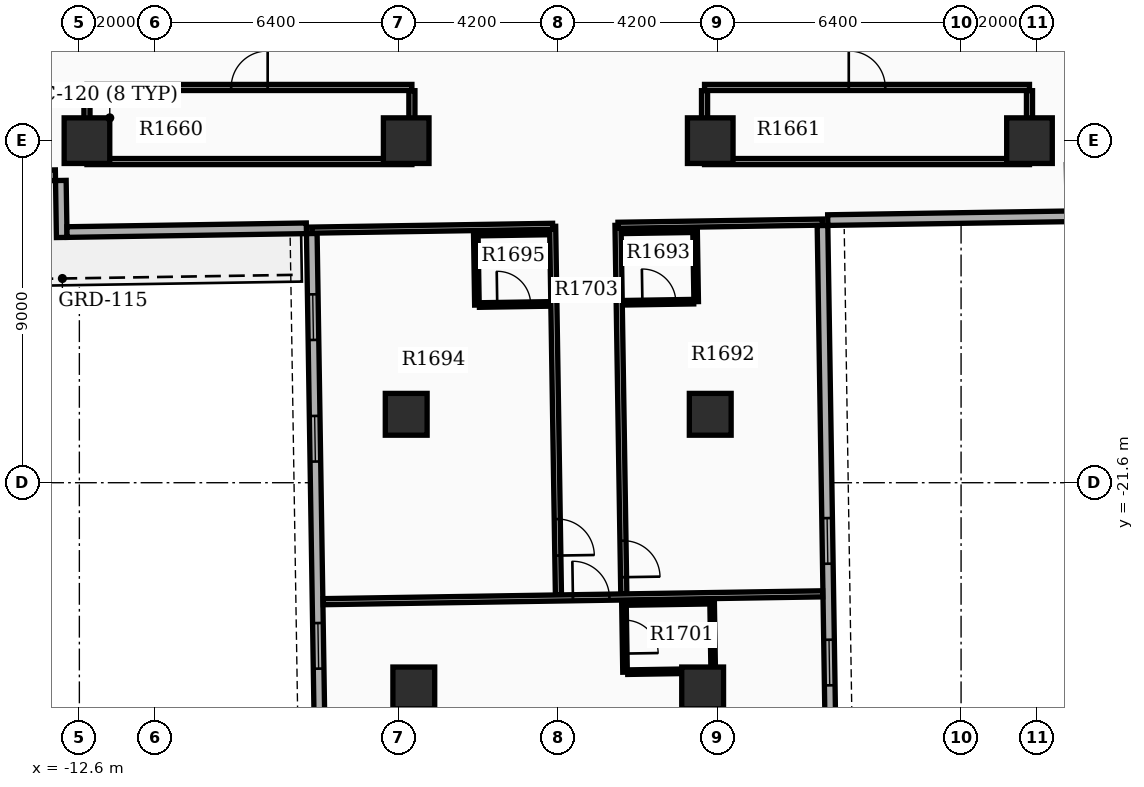
"""IFC4 building model, lengths in metres.
Left out: names, types, materials, properties, quantities, classifications, styles, units other than length and angle.
Written with IfcOpenShell. Run it as: python <this file> out.ifc"""

import sys

from ifc_helpers import new_model, si_unit, direction, frame, frame_2d, origin, origin_2d, place, context, subcontext, project, spatial, rectangle, extrude, element, fill, save


model = new_model("IFC4")
c1 = context("Model", 3, precision=1e-05, world=origin(), true_north=direction((0.0, 1.0)))
c2 = subcontext(c1, "Body", "Model", "MODEL_VIEW")
j1 = project(units=[si_unit("LENGTHUNIT", "METRE"), si_unit("PLANEANGLEUNIT", "RADIAN")], contexts=[c1])
p1 = place(None, origin())
s1 = spatial("IfcSite", under=j1, at=p1, CompositionType="ELEMENT")
p2 = place(p1, origin())
s2 = spatial("IfcBuilding", under=s1, at=p2, CompositionType="ELEMENT")
p3 = place(p2, frame((0.0, 0.0, 108.6)))
s3 = spatial("IfcBuildingStorey", under=s2, at=p3, CompositionType="ELEMENT", Elevation=108.6)
for number, where, z_axis, x_axis in (
    (1, (-12.4, -12.6, 0.0), (0.0, 0.0, 1.0), (1.0, 0.0, 0.0)),
    (2, (12.4, -12.6, 0.0), (0.0, 0.0, 1.0), (1.0, 0.0, 0.0)),
    (3, (-4.0, -12.6, 0.0), (0.0, 0.0, 1.0), (1.0, 0.0, 0.0)),
    (4, (4.0, -12.6, 0.0), (0.0, 0.0, 1.0), (1.0, 0.0, 0.0)),
):
    element("IfcColumn", number, at=place(p3, frame(where, z_axis=z_axis, x_axis=x_axis)), inside=s3, PredefinedType="COLUMN", context=c2, shape_type="SweptSolid", body=[
        extrude(rectangle(XDim=1.2, YDim=1.2, at=origin_2d()), origin(), (0.0, 0.0, 1.0), 3.9),
    ])
for number, where, z_axis, x_axis in (
    (5, (-4.0, -19.8, 0.0), (0.0, 0.0, 1.0), (1.0, 0.0, 0.0)),
    (6, (4.0, -19.8, 0.0), (0.0, 0.0, 1.0), (1.0, 0.0, 0.0)),
    (7, (-3.8, -27.0, 0.0), (0.0, 0.0, 1.0), (1.0, 0.0, 0.0)),
    (8, (3.8, -27.0, 0.0), (0.0, 0.0, 1.0), (1.0, 0.0, 0.0)),
):
    element("IfcColumn", number, at=place(p3, frame(where, z_axis=z_axis, x_axis=x_axis)), inside=s3, PredefinedType="COLUMN", context=c2, shape_type="SweptSolid", body=[
        extrude(rectangle(XDim=1.1, YDim=1.1, at=origin_2d()), origin(), (0.0, 0.0, 1.0), 3.9),
    ])
p4 = place(p3, frame((-6.485, -15.044, 0.0), z_axis=(0.0, 0.0, 1.0), x_axis=(0.01571739401, -0.999876474133, 0.0)))
e9 = element("IfcWall", 9, at=p4, inside=s3, PredefinedType="STANDARD", context=c2, shape_type="SweptSolid", body=[
    extrude(rectangle(XDim=20.1, YDim=0.28, at=frame_2d((10.05, 0.0))), origin(), (0.0, 0.0, 1.0), 2.97),
])
p5 = place(p4, frame((1.6, 0.0, 0.8)))
e10 = element("IfcOpeningElement", 10, at=p5, cuts=e9, PredefinedType="OPENING", context=c2, shape_type="SweptSolid", body=[
    extrude(rectangle(XDim=1.2, YDim=1.6, at=frame_2d((0.6, 0.8))), frame((0.0, 0.15, 0.0), z_axis=(0.0, -1.0, 0.0), x_axis=(1.0, 0.0, 0.0)), (0.0, 0.0, 1.0), 0.3),
])
p6 = place(p4, frame((4.8, 0.0, 0.8)))
e11 = element("IfcOpeningElement", 11, at=p6, cuts=e9, PredefinedType="OPENING", context=c2, shape_type="SweptSolid", body=[
    extrude(rectangle(XDim=1.2, YDim=1.6, at=frame_2d((0.6, 0.8))), frame((0.0, 0.15, 0.0), z_axis=(0.0, -1.0, 0.0), x_axis=(1.0, 0.0, 0.0)), (0.0, 0.0, 1.0), 0.3),
])
p7 = place(p4, frame((10.25, 0.0, 0.8)))
e12 = element("IfcOpeningElement", 12, at=p7, cuts=e9, PredefinedType="OPENING", context=c2, shape_type="SweptSolid", body=[
    extrude(rectangle(XDim=1.2, YDim=1.6, at=frame_2d((0.6, 0.8))), frame((0.0, 0.15, 0.0), z_axis=(0.0, -1.0, 0.0), x_axis=(1.0, 0.0, 0.0)), (0.0, 0.0, 1.0), 0.3),
])
p8 = place(p4, frame((13.45, 0.0, 0.8)))
e13 = element("IfcOpeningElement", 13, at=p8, cuts=e9, PredefinedType="OPENING", context=c2, shape_type="SweptSolid", body=[
    extrude(rectangle(XDim=1.2, YDim=1.6, at=frame_2d((0.6, 0.8))), frame((0.0, 0.15, 0.0), z_axis=(0.0, -1.0, 0.0), x_axis=(1.0, 0.0, 0.0)), (0.0, 0.0, 1.0), 0.3),
])
p9 = place(p3, frame((7.27, -34.93, 0.0), z_axis=(0.0, 0.0, 1.0), x_axis=(-0.015705059908, 0.999876667941, 0.0)))
e14 = element("IfcWall", 14, at=p9, inside=s3, PredefinedType="STANDARD", context=c2, shape_type="SweptSolid", body=[
    extrude(rectangle(XDim=20.1, YDim=0.28, at=frame_2d((10.05, 0.0))), origin(), (0.0, 0.0, 1.0), 2.97),
])
p10 = place(p9, frame((1.6, 0.0, 0.8)))
e15 = element("IfcOpeningElement", 15, at=p10, cuts=e14, PredefinedType="OPENING", context=c2, shape_type="SweptSolid", body=[
    extrude(rectangle(XDim=1.2, YDim=1.6, at=frame_2d((0.6, 0.8))), frame((0.0, 0.15, 0.0), z_axis=(0.0, -1.0, 0.0), x_axis=(1.0, 0.0, 0.0)), (0.0, 0.0, 1.0), 0.3),
])
p11 = place(p9, frame((4.8, 0.0, 0.8)))
e16 = element("IfcOpeningElement", 16, at=p11, cuts=e14, PredefinedType="OPENING", context=c2, shape_type="SweptSolid", body=[
    extrude(rectangle(XDim=1.2, YDim=1.6, at=frame_2d((0.6, 0.8))), frame((0.0, 0.15, 0.0), z_axis=(0.0, -1.0, 0.0), x_axis=(1.0, 0.0, 0.0)), (0.0, 0.0, 1.0), 0.3),
])
p12 = place(p9, frame((8.0, 0.0, 0.8)))
e17 = element("IfcOpeningElement", 17, at=p12, cuts=e14, PredefinedType="OPENING", context=c2, shape_type="SweptSolid", body=[
    extrude(rectangle(XDim=1.2, YDim=1.6, at=frame_2d((0.6, 0.8))), frame((0.0, 0.15, 0.0), z_axis=(0.0, -1.0, 0.0), x_axis=(1.0, 0.0, 0.0)), (0.0, 0.0, 1.0), 0.3),
])
p13 = place(p9, frame((11.2, 0.0, 0.8)))
e18 = element("IfcOpeningElement", 18, at=p13, cuts=e14, PredefinedType="OPENING", context=c2, shape_type="SweptSolid", body=[
    extrude(rectangle(XDim=1.2, YDim=1.6, at=frame_2d((0.6, 0.8))), frame((0.0, 0.15, 0.0), z_axis=(0.0, -1.0, 0.0), x_axis=(1.0, 0.0, 0.0)), (0.0, 0.0, 1.0), 0.3),
])
p14 = place(p3, frame((-14.449, -13.529, 0.0), z_axis=(0.0, 0.0, 1.0), x_axis=(0.999878147354, 0.015610587569, 0.0)))
e19 = element("IfcWall", 19, at=p14, inside=s3, PredefinedType="STANDARD", context=c2, shape_type="SweptSolid", body=[
    extrude(rectangle(XDim=1.22, YDim=0.28, at=frame_2d((0.61, 0.0))), origin(), (0.0, 0.0, 1.0), 2.97),
])
p15 = place(p3, frame((-13.087, -13.647, 0.0), z_axis=(0.0, 0.0, 1.0), x_axis=(0.015785793208, -0.999875396603, 0.0)))
e20 = element("IfcWall", 20, at=p15, inside=s3, PredefinedType="STANDARD", context=c2, shape_type="SweptSolid", body=[
    extrude(rectangle(XDim=1.5, YDim=0.28, at=frame_2d((0.75, 0.0))), origin(), (0.0, 0.0, 1.0), 2.97),
])
p16 = place(p3, frame((-12.926, -15.005, 0.0), z_axis=(0.0, 0.0, 1.0), x_axis=(0.999876823822, 0.015695132501, 0.0)))
e21 = element("IfcWall", 21, at=p16, inside=s3, PredefinedType="STANDARD", context=c2, shape_type="SweptSolid", body=[
    extrude(rectangle(XDim=6.3, YDim=0.28, at=frame_2d((3.15, 0.0))), origin(), (0.0, 0.0, 1.0), 2.97),
])
p17 = place(p3, frame((13.391, -14.592, 0.0), z_axis=(0.0, 0.0, 1.0), x_axis=(-0.999876833368, -0.015694524359, 0.0)))
e22 = element("IfcWall", 22, at=p17, inside=s3, PredefinedType="STANDARD", context=c2, shape_type="SweptSolid", body=[
    extrude(rectangle(XDim=6.3, YDim=0.28, at=frame_2d((3.15, 0.0))), origin(), (0.0, 0.0, 1.0), 2.97),
])
p18 = place(p3, frame((-12.4, -13.15, 0.0), z_axis=(0.0, 0.0, 1.0), x_axis=(1.0, 0.0, 0.0)))
e23 = element("IfcWall", 23, at=p18, inside=s3, PredefinedType="PARTITIONING", context=c2, shape_type="SweptSolid", body=[
    extrude(rectangle(XDim=8.55, YDim=0.16, at=frame_2d((4.275, 0.0))), origin(), (0.0, 0.0, 1.0), 2.96),
])
p19 = place(p3, frame((-12.4, -11.2, 0.0), z_axis=(0.0, 0.0, 1.0), x_axis=(1.0, 0.0, 0.0)))
e24 = element("IfcWall", 24, at=p19, inside=s3, PredefinedType="PARTITIONING", context=c2, shape_type="SweptSolid", body=[
    extrude(rectangle(XDim=8.55, YDim=0.16, at=frame_2d((4.275, 0.0))), origin(), (0.0, 0.0, 1.0), 2.96),
])
p20 = place(p19, frame((3.795, 0.0, 0.0)))
e25 = element("IfcOpeningElement", 25, at=p20, cuts=e24, PredefinedType="OPENING", context=c2, shape_type="SweptSolid", body=[
    extrude(rectangle(XDim=0.96, YDim=2.15, at=frame_2d((0.48, 1.075))), frame((0.0, 0.09, 0.0), z_axis=(0.0, -1.0, 0.0), x_axis=(1.0, 0.0, 0.0)), (0.0, 0.0, 1.0), 0.18),
])
for number, where, z_axis, x_axis in (
    (26, (-12.4, -13.065, 0.0), (0.0, 0.0, 1.0), (0.0, 1.0, 0.0)),
    (27, (-3.85, -13.065, 0.0), (0.0, 0.0, 1.0), (0.0, 1.0, 0.0)),
):
    element("IfcWall", number, at=place(p3, frame(where, z_axis=z_axis, x_axis=x_axis)), inside=s3, PredefinedType="PARTITIONING", context=c2, shape_type="SweptSolid", body=[
        extrude(rectangle(XDim=1.78, YDim=0.16, at=frame_2d((0.89, 0.0))), origin(), (0.0, 0.0, 1.0), 2.96),
    ])
p21 = place(p3, frame((3.85, -13.15, 0.0), z_axis=(0.0, 0.0, 1.0), x_axis=(1.0, 0.0, 0.0)))
e28 = element("IfcWall", 28, at=p21, inside=s3, PredefinedType="PARTITIONING", context=c2, shape_type="SweptSolid", body=[
    extrude(rectangle(XDim=8.55, YDim=0.16, at=frame_2d((4.275, 0.0))), origin(), (0.0, 0.0, 1.0), 2.96),
])
p22 = place(p3, frame((3.85, -11.2, 0.0), z_axis=(0.0, 0.0, 1.0), x_axis=(1.0, 0.0, 0.0)))
e29 = element("IfcWall", 29, at=p22, inside=s3, PredefinedType="PARTITIONING", context=c2, shape_type="SweptSolid", body=[
    extrude(rectangle(XDim=8.55, YDim=0.16, at=frame_2d((4.275, 0.0))), origin(), (0.0, 0.0, 1.0), 2.96),
])
p23 = place(p22, frame((3.795, 0.0, 0.0)))
e30 = element("IfcOpeningElement", 30, at=p23, cuts=e29, PredefinedType="OPENING", context=c2, shape_type="SweptSolid", body=[
    extrude(rectangle(XDim=0.96, YDim=2.15, at=frame_2d((0.48, 1.075))), frame((0.0, 0.09, 0.0), z_axis=(0.0, -1.0, 0.0), x_axis=(1.0, 0.0, 0.0)), (0.0, 0.0, 1.0), 0.18),
])
for number, where, z_axis, x_axis in (
    (31, (3.85, -13.065, 0.0), (0.0, 0.0, 1.0), (0.0, 1.0, 0.0)),
    (32, (12.4, -13.065, 0.0), (0.0, 0.0, 1.0), (0.0, 1.0, 0.0)),
):
    element("IfcWall", number, at=place(p3, frame(where, z_axis=z_axis, x_axis=x_axis)), inside=s3, PredefinedType="PARTITIONING", context=c2, shape_type="SweptSolid", body=[
        extrude(rectangle(XDim=1.78, YDim=0.16, at=frame_2d((0.89, 0.0))), origin(), (0.0, 0.0, 1.0), 2.96),
    ])
p24 = place(p3, frame((1.573, -14.827, 0.0), z_axis=(0.0, 0.0, 1.0), x_axis=(0.015705659641, -0.999876658521, 0.0)))
e33 = element("IfcWall", 33, at=p24, inside=s3, PredefinedType="PARTITIONING", context=c2, shape_type="SweptSolid", body=[
    extrude(rectangle(XDim=9.7, YDim=0.16, at=frame_2d((4.85, 0.0))), origin(), (0.0, 0.0, 1.0), 2.96),
])
p25 = place(p24, frame((8.3, 0.0, 0.0)))
e34 = element("IfcOpeningElement", 34, at=p25, cuts=e33, PredefinedType="OPENING", context=c2, shape_type="SweptSolid", body=[
    extrude(rectangle(XDim=0.96, YDim=2.15, at=frame_2d((0.48, 1.075))), frame((0.0, 0.09, 0.0), z_axis=(0.0, -1.0, 0.0), x_axis=(1.0, 0.0, 0.0)), (0.0, 0.0, 1.0), 0.18),
])
p26 = place(p3, frame((1.573, -14.827, 0.0), z_axis=(0.0, 0.0, 1.0), x_axis=(0.999876730622, 0.015701068748, 0.0)))
e35 = element("IfcWall", 35, at=p26, inside=s3, PredefinedType="PARTITIONING", context=c2, shape_type="SweptSolid", body=[
    extrude(rectangle(XDim=5.38, YDim=0.16, at=frame_2d((2.69, 0.0))), origin(), (0.0, 0.0, 1.0), 2.96),
])
p27 = place(p3, frame((1.745, -16.865, 0.0), z_axis=(0.0, 0.0, 1.0), x_axis=(0.999876836305, 0.015694337248, 0.0)))
e36 = element("IfcWall", 36, at=p27, inside=s3, PredefinedType="PARTITIONING", context=c2, shape_type="SweptSolid", body=[
    extrude(rectangle(XDim=1.82, YDim=0.12, at=frame_2d((0.91, 0.0))), origin(), (0.0, 0.0, 1.0), 2.96),
])
p28 = place(p27, frame((0.47, 0.0, 0.0)))
e37 = element("IfcOpeningElement", 37, at=p28, cuts=e36, PredefinedType="OPENING", context=c2, shape_type="SweptSolid", body=[
    extrude(rectangle(XDim=0.88, YDim=2.1, at=frame_2d((0.44, 1.05))), frame((0.0, 0.07, 0.0), z_axis=(0.0, -1.0, 0.0), x_axis=(1.0, 0.0, 0.0)), (0.0, 0.0, 1.0), 0.14),
])
p29 = place(p3, frame((1.716, -14.985, 0.0), z_axis=(0.0, 0.0, 1.0), x_axis=(0.999876836305, 0.015694337248, 0.0)))
e38 = element("IfcWall", 38, at=p29, inside=s3, PredefinedType="PARTITIONING", context=c2, shape_type="SweptSolid", body=[
    extrude(rectangle(XDim=1.82, YDim=0.12, at=frame_2d((0.91, 0.0))), origin(), (0.0, 0.0, 1.0), 2.96),
])
p30 = place(p3, frame((3.6, -14.955, 0.0), z_axis=(0.0, 0.0, 1.0), x_axis=(0.01571234584, -0.999876553475, 0.0)))
e39 = element("IfcWall", 39, at=p30, inside=s3, PredefinedType="PARTITIONING", context=c2, shape_type="SweptSolid", body=[
    extrude(rectangle(XDim=1.88, YDim=0.12, at=frame_2d((0.94, 0.0))), origin(), (0.0, 0.0, 1.0), 2.96),
])
p31 = place(p3, frame((-0.147, -14.854, 0.0), z_axis=(0.0, 0.0, 1.0), x_axis=(0.015705264399, -0.999876664729, 0.0)))
e40 = element("IfcWall", 40, at=p31, inside=s3, PredefinedType="PARTITIONING", context=c2, shape_type="SweptSolid", body=[
    extrude(rectangle(XDim=9.7, YDim=0.16, at=frame_2d((4.85, 0.0))), origin(), (0.0, 0.0, 1.0), 2.96),
])
p32 = place(p31, frame((7.704, 0.0, 0.0)))
e41 = element("IfcOpeningElement", 41, at=p32, cuts=e40, PredefinedType="OPENING", context=c2, shape_type="SweptSolid", body=[
    extrude(rectangle(XDim=0.96, YDim=2.15, at=frame_2d((0.48, 1.075))), frame((0.0, 0.09, 0.0), z_axis=(0.0, -1.0, 0.0), x_axis=(1.0, 0.0, 0.0)), (0.0, 0.0, 1.0), 0.18),
])
p33 = place(p3, frame((-0.147, -14.854, 0.0), z_axis=(0.0, 0.0, 1.0), x_axis=(-0.999876566438, -0.015711520859, 0.0)))
e42 = element("IfcWall", 42, at=p33, inside=s3, PredefinedType="PARTITIONING", context=c2, shape_type="SweptSolid", body=[
    extrude(rectangle(XDim=6.34, YDim=0.16, at=frame_2d((3.17, 0.0))), origin(), (0.0, 0.0, 1.0), 2.96),
])
p34 = place(p3, frame((-2.074, -16.925, 0.0), z_axis=(0.0, 0.0, 1.0), x_axis=(0.999874722342, 0.015828443418, 0.0)))
e43 = element("IfcWall", 43, at=p34, inside=s3, PredefinedType="PARTITIONING", context=c2, shape_type="SweptSolid", body=[
    extrude(rectangle(XDim=1.82, YDim=0.12, at=frame_2d((0.91, 0.0))), origin(), (0.0, 0.0, 1.0), 2.96),
])
p35 = place(p34, frame((0.47, 0.0, 0.0)))
e44 = element("IfcOpeningElement", 44, at=p35, cuts=e43, PredefinedType="OPENING", context=c2, shape_type="SweptSolid", body=[
    extrude(rectangle(XDim=0.88, YDim=2.1, at=frame_2d((0.44, 1.05))), frame((0.0, 0.07, 0.0), z_axis=(0.0, -1.0, 0.0), x_axis=(1.0, 0.0, 0.0)), (0.0, 0.0, 1.0), 0.14),
])
p36 = place(p3, frame((-2.104, -15.045, 0.0), z_axis=(0.0, 0.0, 1.0), x_axis=(0.999876836305, 0.015694337248, 0.0)))
e45 = element("IfcWall", 45, at=p36, inside=s3, PredefinedType="PARTITIONING", context=c2, shape_type="SweptSolid", body=[
    extrude(rectangle(XDim=1.82, YDim=0.12, at=frame_2d((0.91, 0.0))), origin(), (0.0, 0.0, 1.0), 2.96),
])
p37 = place(p3, frame((-2.169, -15.046, 0.0), z_axis=(0.0, 0.0, 1.0), x_axis=(0.01571234584, -0.999876553475, 0.0)))
e46 = element("IfcWall", 46, at=p37, inside=s3, PredefinedType="PARTITIONING", context=c2, shape_type="SweptSolid", body=[
    extrude(rectangle(XDim=1.88, YDim=0.12, at=frame_2d((0.94, 0.0))), origin(), (0.0, 0.0, 1.0), 2.96),
])
p38 = place(p3, frame((-6.184, -24.73, 0.0), z_axis=(0.0, 0.0, 1.0), x_axis=(0.999876528878, 0.015713911007, 0.0)))
e47 = element("IfcWall", 47, at=p38, inside=s3, PredefinedType="PARTITIONING", context=c2, shape_type="SweptSolid", body=[
    extrude(rectangle(XDim=13.144, YDim=0.16, at=frame_2d((6.572, 0.0))), origin(), (0.0, 0.0, 1.0), 2.96),
])
p39 = place(p38, frame((6.572, 0.0, 0.0)))
e48 = element("IfcOpeningElement", 48, at=p39, cuts=e47, PredefinedType="OPENING", context=c2, shape_type="SweptSolid", body=[
    extrude(rectangle(XDim=0.96, YDim=2.15, at=frame_2d((0.48, 1.075))), frame((0.0, 0.09, 0.0), z_axis=(0.0, -1.0, 0.0), x_axis=(1.0, 0.0, 0.0)), (0.0, 0.0, 1.0), 0.18),
])
p40 = place(p3, frame((1.729, -24.766, 0.0), z_axis=(0.0, 0.0, 1.0), x_axis=(0.015694337248, -0.999876836305, 0.0)))
e49 = element("IfcWall", 49, at=p40, inside=s3, PredefinedType="PARTITIONING", context=c2, shape_type="SweptSolid", body=[
    extrude(rectangle(XDim=1.82, YDim=0.12, at=frame_2d((0.91, 0.0))), origin(), (0.0, 0.0, 1.0), 2.96),
])
p41 = place(p40, frame((0.45, 0.0, 0.0)))
e50 = element("IfcOpeningElement", 50, at=p41, cuts=e49, PredefinedType="OPENING", context=c2, shape_type="SweptSolid", body=[
    extrude(rectangle(XDim=0.88, YDim=2.1, at=frame_2d((0.44, 1.05))), frame((0.0, 0.07, 0.0), z_axis=(0.0, -1.0, 0.0), x_axis=(1.0, 0.0, 0.0)), (0.0, 0.0, 1.0), 0.14),
])
p42 = place(p3, frame((4.049, -24.729, 0.0), z_axis=(0.0, 0.0, 1.0), x_axis=(0.015694337248, -0.999876836305, 0.0)))
e51 = element("IfcWall", 51, at=p42, inside=s3, PredefinedType="PARTITIONING", context=c2, shape_type="SweptSolid", body=[
    extrude(rectangle(XDim=1.82, YDim=0.12, at=frame_2d((0.91, 0.0))), origin(), (0.0, 0.0, 1.0), 2.96),
])
for number, where, z_axis, x_axis in (
    (52, (1.799, -24.765, 0.0), (0.0, 0.0, 1.0), (1.0, 0.016, 0.0)),
    (53, (1.828, -26.585, 0.0), (0.0, 0.0, 1.0), (1.0, 0.016, 0.0)),
):
    element("IfcWall", number, at=place(p3, frame(where, z_axis=z_axis, x_axis=x_axis)), inside=s3, PredefinedType="PARTITIONING", context=c2, shape_type="SweptSolid", body=[
        extrude(rectangle(XDim=2.18, YDim=0.12, at=frame_2d((1.09, 0.0))), origin(), (0.0, 0.0, 1.0), 2.96),
    ])
p43 = place(p5, origin())
e54 = element("IfcWindow", 54, at=p43, inside=s3, PartitioningType="SINGLE_PANEL", PredefinedType="WINDOW", context=c2, shape_type="SweptSolid", body=[
    extrude(rectangle(XDim=1.2, YDim=1.6, at=frame_2d((0.6, 0.8))), frame((0.0, 0.03, 0.0), z_axis=(0.0, -1.0, 0.0), x_axis=(1.0, 0.0, 0.0)), (0.0, 0.0, 1.0), 0.06),
])
fill(e10, e54)
p44 = place(p6, origin())
e55 = element("IfcWindow", 55, at=p44, inside=s3, PartitioningType="SINGLE_PANEL", PredefinedType="WINDOW", context=c2, shape_type="SweptSolid", body=[
    extrude(rectangle(XDim=1.2, YDim=1.6, at=frame_2d((0.6, 0.8))), frame((0.0, 0.03, 0.0), z_axis=(0.0, -1.0, 0.0), x_axis=(1.0, 0.0, 0.0)), (0.0, 0.0, 1.0), 0.06),
])
fill(e11, e55)
p45 = place(p7, origin())
e56 = element("IfcWindow", 56, at=p45, inside=s3, PartitioningType="SINGLE_PANEL", PredefinedType="WINDOW", context=c2, shape_type="SweptSolid", body=[
    extrude(rectangle(XDim=1.2, YDim=1.6, at=frame_2d((0.6, 0.8))), frame((0.0, 0.03, 0.0), z_axis=(0.0, -1.0, 0.0), x_axis=(1.0, 0.0, 0.0)), (0.0, 0.0, 1.0), 0.06),
])
fill(e12, e56)
p46 = place(p12, origin())
e57 = element("IfcWindow", 57, at=p46, inside=s3, PartitioningType="SINGLE_PANEL", PredefinedType="WINDOW", context=c2, shape_type="SweptSolid", body=[
    extrude(rectangle(XDim=1.2, YDim=1.6, at=frame_2d((0.6, 0.8))), frame((0.0, 0.03, 0.0), z_axis=(0.0, -1.0, 0.0), x_axis=(1.0, 0.0, 0.0)), (0.0, 0.0, 1.0), 0.06),
])
fill(e17, e57)
p47 = place(p13, origin())
e58 = element("IfcWindow", 58, at=p47, inside=s3, PartitioningType="SINGLE_PANEL", PredefinedType="WINDOW", context=c2, shape_type="SweptSolid", body=[
    extrude(rectangle(XDim=1.2, YDim=1.6, at=frame_2d((0.6, 0.8))), frame((0.0, 0.03, 0.0), z_axis=(0.0, -1.0, 0.0), x_axis=(1.0, 0.0, 0.0)), (0.0, 0.0, 1.0), 0.06),
])
fill(e18, e58)
p48 = place(p20, origin())
e59 = element("IfcDoor", 59, at=p48, inside=s3, OperationType="SINGLE_SWING_RIGHT", PredefinedType="DOOR", context=c2, shape_type="SweptSolid", body=[
    extrude(rectangle(XDim=0.96, YDim=2.15, at=frame_2d((0.48, 1.075))), frame((0.0, 0.025, 0.0), z_axis=(0.0, -1.0, 0.0), x_axis=(1.0, 0.0, 0.0)), (0.0, 0.0, 1.0), 0.05),
])
fill(e25, e59)
p49 = place(p23, origin())
e60 = element("IfcDoor", 60, at=p49, inside=s3, OperationType="SINGLE_SWING_LEFT", PredefinedType="DOOR", context=c2, shape_type="SweptSolid", body=[
    extrude(rectangle(XDim=0.96, YDim=2.15, at=frame_2d((0.48, 1.075))), frame((0.0, 0.025, 0.0), z_axis=(0.0, -1.0, 0.0), x_axis=(1.0, 0.0, 0.0)), (0.0, 0.0, 1.0), 0.05),
])
fill(e30, e60)
p50 = place(p25, origin())
e61 = element("IfcDoor", 61, at=p50, inside=s3, OperationType="SINGLE_SWING_RIGHT", PredefinedType="DOOR", context=c2, shape_type="SweptSolid", body=[
    extrude(rectangle(XDim=0.96, YDim=2.15, at=frame_2d((0.48, 1.075))), frame((0.0, 0.025, 0.0), z_axis=(0.0, -1.0, 0.0), x_axis=(1.0, 0.0, 0.0)), (0.0, 0.0, 1.0), 0.05),
])
fill(e34, e61)
p51 = place(p28, origin())
e62 = element("IfcDoor", 62, at=p51, inside=s3, OperationType="SINGLE_SWING_LEFT", PredefinedType="DOOR", context=c2, shape_type="SweptSolid", body=[
    extrude(rectangle(XDim=0.88, YDim=2.1, at=frame_2d((0.44, 1.05))), frame((0.0, 0.025, 0.0), z_axis=(0.0, -1.0, 0.0), x_axis=(1.0, 0.0, 0.0)), (0.0, 0.0, 1.0), 0.05),
])
fill(e37, e62)
p52 = place(p32, origin())
e63 = element("IfcDoor", 63, at=p52, inside=s3, OperationType="SINGLE_SWING_RIGHT", PredefinedType="DOOR", context=c2, shape_type="SweptSolid", body=[
    extrude(rectangle(XDim=0.96, YDim=2.15, at=frame_2d((0.48, 1.075))), frame((0.0, 0.025, 0.0), z_axis=(0.0, -1.0, 0.0), x_axis=(1.0, 0.0, 0.0)), (0.0, 0.0, 1.0), 0.05),
])
fill(e41, e63)
p53 = place(p35, origin())
e64 = element("IfcDoor", 64, at=p53, inside=s3, OperationType="SINGLE_SWING_LEFT", PredefinedType="DOOR", context=c2, shape_type="SweptSolid", body=[
    extrude(rectangle(XDim=0.88, YDim=2.1, at=frame_2d((0.44, 1.05))), frame((0.0, 0.025, 0.0), z_axis=(0.0, -1.0, 0.0), x_axis=(1.0, 0.0, 0.0)), (0.0, 0.0, 1.0), 0.05),
])
fill(e44, e64)
p54 = place(p39, origin())
e65 = element("IfcDoor", 65, at=p54, inside=s3, OperationType="SINGLE_SWING_LEFT", PredefinedType="DOOR", context=c2, shape_type="SweptSolid", body=[
    extrude(rectangle(XDim=0.96, YDim=2.15, at=frame_2d((0.48, 1.075))), frame((0.0, 0.025, 0.0), z_axis=(0.0, -1.0, 0.0), x_axis=(1.0, 0.0, 0.0)), (0.0, 0.0, 1.0), 0.05),
])
fill(e48, e65)
p55 = place(p41, origin())
e66 = element("IfcDoor", 66, at=p55, inside=s3, OperationType="SINGLE_SWING_RIGHT", PredefinedType="DOOR", context=c2, shape_type="SweptSolid", body=[
    extrude(rectangle(XDim=0.88, YDim=2.1, at=frame_2d((0.44, 1.05))), frame((0.0, 0.025, 0.0), z_axis=(0.0, -1.0, 0.0), x_axis=(1.0, 0.0, 0.0)), (0.0, 0.0, 1.0), 0.05),
])
fill(e50, e66)
save(model, sys.argv[1])
